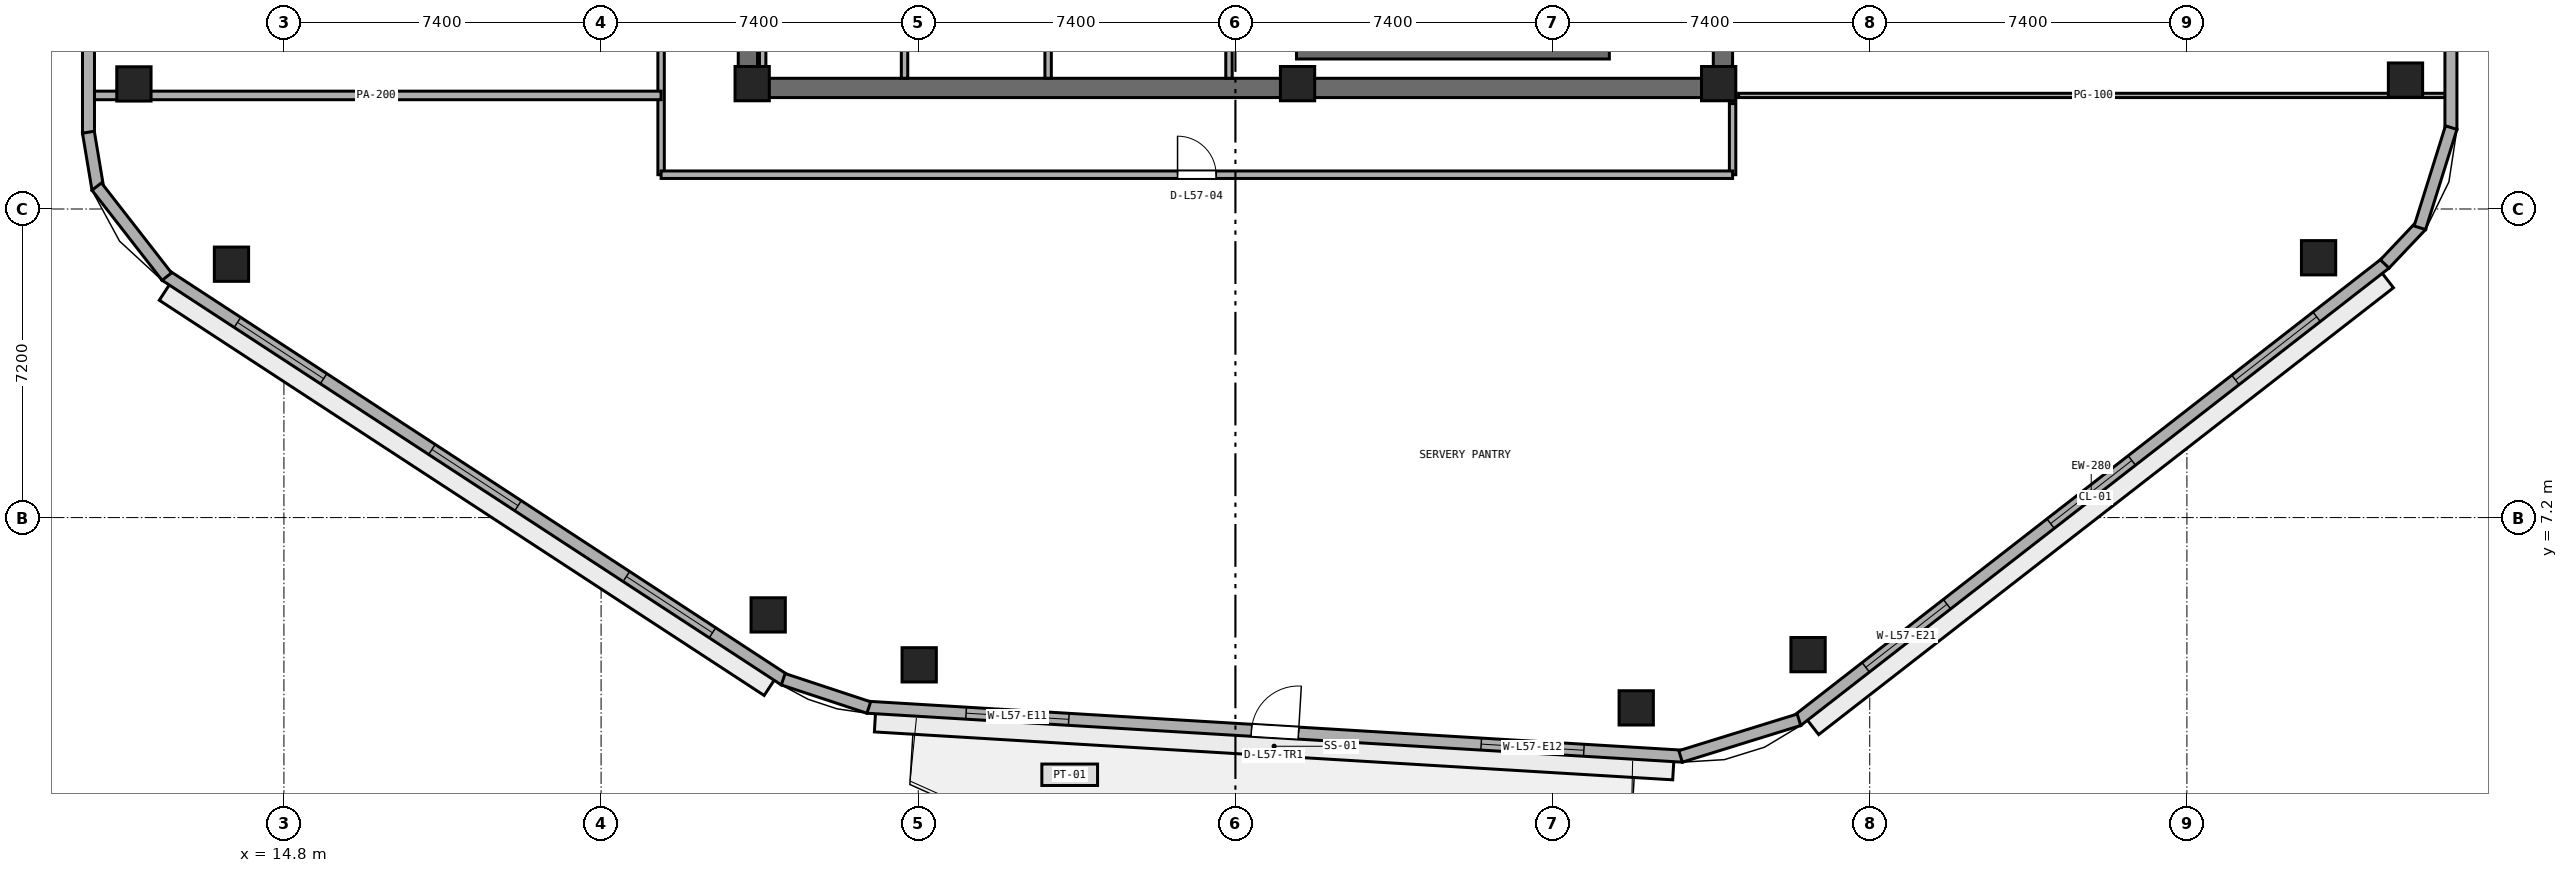
"""IFC4 building model, lengths in metres.
Left out: names, types, materials, properties, quantities, classifications, styles, units other than length and angle.
Written with IfcOpenShell. Run it as: python <this file> out.ifc"""

import sys

from ifc_helpers import new_model, si_unit, direction, frame, frame_2d, origin, origin_2d, place, context, subcontext, project, spatial, rectangle, extrude, element, fill, save


model = new_model("IFC4")
c1 = context("Model", 3, precision=1e-05, world=origin(), true_north=direction((0.0, 1.0)))
c2 = subcontext(c1, "Body", "Model", "MODEL_VIEW")
j1 = project(units=[si_unit("LENGTHUNIT", "METRE"), si_unit("PLANEANGLEUNIT", "RADIAN")], contexts=[c1])
p1 = place(None, origin())
s1 = spatial("IfcSite", under=j1, at=p1, CompositionType="ELEMENT")
p2 = place(p1, origin())
s2 = spatial("IfcBuilding", under=s1, at=p2, CompositionType="ELEMENT")
p3 = place(p2, frame((0.0, 0.0, 225.0)))
s3 = spatial("IfcBuildingStorey", under=s2, at=p3, CompositionType="ELEMENT", Elevation=225.0)
p4 = place(p3, frame((25.4, 17.225, 0.0), z_axis=(0.0, 0.0, 1.0), x_axis=(1.0, 0.0, 0.0)))
e1 = element("IfcWall", 1, at=p4, inside=s3, PredefinedType="SHEAR", context=c2, shape_type="SweptSolid", body=[
    extrude(rectangle(XDim=23.2, YDim=0.45, at=frame_2d((11.6, 0.0))), origin(), (0.0, 0.0, 1.0), 3.51),
])
p5 = place(p3, frame((25.625, 17.45, 0.0), z_axis=(0.0, 0.0, 1.0), x_axis=(0.0, 1.0, 0.0)))
e2 = element("IfcWall", 2, at=p5, inside=s3, PredefinedType="SHEAR", context=c2, shape_type="SweptSolid", body=[
    extrude(rectangle(XDim=15.5, YDim=0.45, at=frame_2d((7.75, 0.0))), origin(), (0.0, 0.0, 1.0), 3.51),
])
p6 = place(p5, frame((7.0, 0.0, 0.0)))
e3 = element("IfcOpeningElement", 3, at=p6, cuts=e2, PredefinedType="OPENING", context=c2, shape_type="SweptSolid", body=[
    extrude(rectangle(XDim=1.5, YDim=2.15, at=frame_2d((0.75, 1.075))), frame((0.0, 0.235, 0.0), z_axis=(0.0, -1.0, 0.0), x_axis=(1.0, 0.0, 0.0)), (0.0, 0.0, 1.0), 0.47),
])
p7 = place(p3, frame((48.375, 17.45, 0.0), z_axis=(0.0, 0.0, 1.0), x_axis=(0.0, 1.0, 0.0)))
e4 = element("IfcWall", 4, at=p7, inside=s3, PredefinedType="SHEAR", context=c2, shape_type="SweptSolid", body=[
    extrude(rectangle(XDim=15.5, YDim=0.45, at=frame_2d((7.75, 0.0))), origin(), (0.0, 0.0, 1.0), 3.51),
])
p8 = place(p7, frame((5.85, 0.0, 0.0)))
e5 = element("IfcOpeningElement", 5, at=p8, cuts=e4, PredefinedType="OPENING", context=c2, shape_type="SweptSolid", body=[
    extrude(rectangle(XDim=1.5, YDim=2.15, at=frame_2d((0.75, 1.075))), frame((0.0, 0.235, 0.0), z_axis=(0.0, -1.0, 0.0), x_axis=(1.0, 0.0, 0.0)), (0.0, 0.0, 1.0), 0.47),
])
for number, where, z_axis, x_axis in (
    (6, (25.725, 17.325, 0.0), (0.0, 0.0, 1.0), (1.0, 0.0, 0.0)),
    (7, (38.45, 17.325, 0.0), (0.0, 0.0, 1.0), (1.0, 0.0, 0.0)),
    (8, (48.275, 17.325, 0.0), (0.0, 0.0, 1.0), (1.0, 0.0, 0.0)),
):
    element("IfcColumn", number, at=place(p3, frame(where, z_axis=z_axis, x_axis=x_axis)), inside=s3, PredefinedType="PILASTER", context=c2, shape_type="SweptSolid", body=[
        extrude(rectangle(XDim=0.8, YDim=0.8, at=origin_2d()), origin(), (0.0, 0.0, 1.0), 3.8),
    ])
for number, where, z_axis, x_axis in (
    (9, (29.622, 3.764, 0.0), (0.0, 0.0, 1.0), (1.0, 0.0, 0.0)),
    (10, (46.352, 2.76, 0.0), (0.0, 0.0, 1.0), (1.0, 0.0, 0.0)),
    (11, (50.361, 4.002, 0.0), (0.0, 0.0, 1.0), (1.0, 0.0, 0.0)),
    (12, (62.272, 13.262, 0.0), (0.0, 0.0, 1.0), (1.0, 0.0, 0.0)),
    (13, (64.3, 17.408, 0.0), (0.0, 0.0, 1.0), (1.0, 0.0, 0.0)),
    (14, (11.3, 17.319, 0.0), (0.0, 0.0, 1.0), (1.0, 0.0, 0.0)),
    (15, (13.576, 13.112, 0.0), (0.0, 0.0, 1.0), (1.0, 0.0, 0.0)),
    (16, (26.099, 4.929, 0.0), (0.0, 0.0, 1.0), (1.0, 0.0, 0.0)),
):
    element("IfcColumn", number, at=place(p3, frame(where, z_axis=z_axis, x_axis=x_axis)), inside=s3, PredefinedType="COLUMN", context=c2, shape_type="SweptSolid", body=[
        extrude(rectangle(XDim=0.8, YDim=0.8, at=origin_2d()), origin(), (0.0, 0.0, 1.0), 3.8),
    ])
p9 = place(p3, frame((38.425, 18.025, 0.0), z_axis=(0.0, 0.0, 1.0), x_axis=(1.0, 0.0, 0.0)))
e17 = element("IfcWall", 17, at=p9, inside=s3, PredefinedType="SHEAR", context=c2, shape_type="SweptSolid", body=[
    extrude(rectangle(XDim=7.3, YDim=0.25, at=frame_2d((3.65, 0.0))), origin(), (0.0, 0.0, 1.0), 3.51),
])
p10 = place(p3, frame((25.97, 17.45, 0.0), z_axis=(0.0, 0.0, 1.0), x_axis=(0.0, 1.0, 0.0)))
e18 = element("IfcWall", 18, at=p10, inside=s3, PredefinedType="PARTITIONING", context=c2, shape_type="SweptSolid", body=[
    extrude(rectangle(XDim=2.3, YDim=0.15, at=frame_2d((1.15, 0.0))), origin(), (0.0, 0.0, 1.0), 2.61),
])
for number, where, z_axis, x_axis in (
    (19, (29.28, 17.45, 0.0), (0.0, 0.0, 1.0), (0.0, 1.0, 0.0)),
    (20, (32.63, 17.45, 0.0), (0.0, 0.0, 1.0), (0.0, 1.0, 0.0)),
    (21, (36.85, 17.45, 0.0), (0.0, 0.0, 1.0), (0.0, 1.0, 0.0)),
):
    element("IfcWall", number, at=place(p3, frame(where, z_axis=z_axis, x_axis=x_axis)), inside=s3, PredefinedType="PARTITIONING", context=c2, shape_type="SweptSolid", body=[
        extrude(rectangle(XDim=2.3, YDim=0.15, at=frame_2d((1.15, 0.0))), origin(), (0.0, 0.0, 1.0), 3.51),
    ])
p11 = place(p3, frame((48.6, 15.2, 0.0), z_axis=(0.0, 0.0, 1.0), x_axis=(0.0, 1.0, 0.0)))
e22 = element("IfcWall", 22, at=p11, inside=s3, PredefinedType="PARTITIONING", context=c2, shape_type="SweptSolid", body=[
    extrude(rectangle(XDim=1.66, YDim=0.15, at=frame_2d((0.83, 0.0))), origin(), (0.0, 0.0, 1.0), 2.893),
])
p12 = place(p3, frame((23.6, 15.2, 0.0), z_axis=(0.0, 0.0, 1.0), x_axis=(0.0, 1.0, 0.0)))
e23 = element("IfcWall", 23, at=p12, inside=s3, PredefinedType="PARTITIONING", context=c2, shape_type="SweptSolid", body=[
    extrude(rectangle(XDim=7.6, YDim=0.15, at=frame_2d((3.8, 0.0))), origin(), (0.0, 0.0, 1.0), 3.51),
])
p13 = place(p3, frame((23.6, 15.2, 0.0), z_axis=(0.0, 0.0, 1.0), x_axis=(1.0, 0.0, 0.0)))
e24 = element("IfcWall", 24, at=p13, inside=s3, PredefinedType="PARTITIONING", context=c2, shape_type="SweptSolid", body=[
    extrude(rectangle(XDim=25.0, YDim=0.175, at=frame_2d((12.5, 0.0))), origin(), (0.0, 0.0, 1.0), 3.51),
])
p14 = place(p13, frame((12.05, 0.0, 0.0)))
e25 = element("IfcOpeningElement", 25, at=p14, cuts=e24, PredefinedType="OPENING", context=c2, shape_type="SweptSolid", body=[
    extrude(rectangle(XDim=0.9, YDim=2.1, at=frame_2d((0.45, 1.05))), frame((0.0, 0.097, 0.0), z_axis=(0.0, -1.0, 0.0), x_axis=(1.0, 0.0, 0.0)), (0.0, 0.0, 1.0), 0.195),
])
p15 = place(p3, frame((10.305, 17.05, 0.0), z_axis=(0.0, 0.0, 1.0), x_axis=(1.0, 0.0, 0.0)))
e26 = element("IfcWall", 26, at=p15, inside=s3, PredefinedType="PARTITIONING", context=c2, shape_type="SweptSolid", body=[
    extrude(rectangle(XDim=13.295, YDim=0.2, at=frame_2d((6.647, 0.0))), origin(), (0.0, 0.0, 1.0), 3.51),
])
p16 = place(p3, frame((48.74, 17.05, 0.0), z_axis=(0.0, 0.0, 1.0), x_axis=(1.0, 0.0, 0.0)))
e27 = element("IfcWall", 27, at=p16, inside=s3, PredefinedType="PARTITIONING", context=c2, shape_type="SweptSolid", body=[
    extrude(rectangle(XDim=16.555, YDim=0.1, at=frame_2d((8.277, 0.0))), origin(), (0.0, 0.0, 1.0), 2.893),
])
p17 = place(p3, frame((28.411, 2.774, 0.0), z_axis=(0.0, 0.0, 1.0), x_axis=(0.998203068368, -0.059921901676, 0.0)))
e28 = element("IfcWall", 28, at=p17, inside=s3, PredefinedType="STANDARD", context=c2, shape_type="SweptSolid", body=[
    extrude(rectangle(XDim=19.06, YDim=0.28, at=frame_2d((9.53, 0.0))), origin(), (0.0, 0.0, 1.0), 3.51),
])
p18 = place(p17, frame((8.98, 0.0, 0.0)))
e29 = element("IfcOpeningElement", 29, at=p18, cuts=e28, PredefinedType="OPENING", context=c2, shape_type="SweptSolid", body=[
    extrude(rectangle(XDim=1.1, YDim=2.2, at=frame_2d((0.55, 1.1))), frame((0.0, 0.15, 0.0), z_axis=(0.0, -1.0, 0.0), x_axis=(1.0, 0.0, 0.0)), (0.0, 0.0, 1.0), 0.3),
])
p19 = place(p17, frame((2.31, 0.0, 0.9)))
e30 = element("IfcOpeningElement", 30, at=p19, cuts=e28, PredefinedType="OPENING", context=c2, shape_type="SweptSolid", body=[
    extrude(rectangle(XDim=2.4, YDim=1.75, at=frame_2d((1.2, 0.875))), frame((0.0, 0.15, 0.0), z_axis=(0.0, -1.0, 0.0), x_axis=(1.0, 0.0, 0.0)), (0.0, 0.0, 1.0), 0.3),
])
p20 = place(p17, frame((14.35, 0.0, 0.9)))
e31 = element("IfcOpeningElement", 31, at=p20, cuts=e28, PredefinedType="OPENING", context=c2, shape_type="SweptSolid", body=[
    extrude(rectangle(XDim=2.4, YDim=1.75, at=frame_2d((1.2, 0.875))), frame((0.0, 0.15, 0.0), z_axis=(0.0, -1.0, 0.0), x_axis=(1.0, 0.0, 0.0)), (0.0, 0.0, 1.0), 0.3),
])
p21 = place(p3, frame((50.104, 2.459, 0.0), z_axis=(0.0, 0.0, 1.0), x_axis=(0.789464857485, 0.613795763097, 0.0)))
e32 = element("IfcWall", 32, at=p21, inside=s3, PredefinedType="STANDARD", context=c2, shape_type="SweptSolid", body=[
    extrude(rectangle(XDim=17.387, YDim=0.28, at=frame_2d((8.694, 0.0))), origin(), (0.0, 0.0, 1.0), 3.51),
])
p22 = place(p21, frame((2.031, 0.0, 0.9)))
e33 = element("IfcOpeningElement", 33, at=p22, cuts=e32, PredefinedType="OPENING", context=c2, shape_type="SweptSolid", body=[
    extrude(rectangle(XDim=2.4, YDim=1.75, at=frame_2d((1.2, 0.875))), frame((0.0, 0.15, 0.0), z_axis=(0.0, -1.0, 0.0), x_axis=(1.0, 0.0, 0.0)), (0.0, 0.0, 1.0), 0.3),
])
p23 = place(p21, frame((7.494, 0.0, 0.9)))
e34 = element("IfcOpeningElement", 34, at=p23, cuts=e32, PredefinedType="OPENING", context=c2, shape_type="SweptSolid", body=[
    extrude(rectangle(XDim=2.4, YDim=1.75, at=frame_2d((1.2, 0.875))), frame((0.0, 0.15, 0.0), z_axis=(0.0, -1.0, 0.0), x_axis=(1.0, 0.0, 0.0)), (0.0, 0.0, 1.0), 0.3),
])
p24 = place(p21, frame((12.956, 0.0, 0.9)))
e35 = element("IfcOpeningElement", 35, at=p24, cuts=e32, PredefinedType="OPENING", context=c2, shape_type="SweptSolid", body=[
    extrude(rectangle(XDim=2.4, YDim=1.75, at=frame_2d((1.2, 0.875))), frame((0.0, 0.15, 0.0), z_axis=(0.0, -1.0, 0.0), x_axis=(1.0, 0.0, 0.0)), (0.0, 0.0, 1.0), 0.3),
])
p25 = place(p3, frame((65.36, 16.258, 0.0), z_axis=(0.0, 0.0, 1.0), x_axis=(0.0, 1.0, 0.0)))
e36 = element("IfcWall", 36, at=p25, inside=s3, PredefinedType="STANDARD", context=c2, shape_type="SweptSolid", body=[
    extrude(rectangle(XDim=5.872, YDim=0.28, at=frame_2d((2.936, 0.0))), origin(), (0.0, 0.0, 1.0), 3.51),
])
p26 = place(p3, frame((10.24, 19.75, 0.0), z_axis=(0.0, 0.0, 1.0), x_axis=(0.0, -1.0, 0.0)))
e37 = element("IfcWall", 37, at=p26, inside=s3, PredefinedType="STANDARD", context=c2, shape_type="SweptSolid", body=[
    extrude(rectangle(XDim=3.581, YDim=0.28, at=frame_2d((1.791, 0.0))), origin(), (0.0, 0.0, 1.0), 3.51),
])
p27 = place(p3, frame((12.034, 12.854, 0.0), z_axis=(0.0, 0.0, 1.0), x_axis=(0.837118352984, -0.547021812269, 0.0)))
e38 = element("IfcWall", 38, at=p27, inside=s3, PredefinedType="STANDARD", context=c2, shape_type="SweptSolid", body=[
    extrude(rectangle(XDim=17.259, YDim=0.28, at=frame_2d((8.63, 0.0))), origin(), (0.0, 0.0, 1.0), 3.51),
])
p28 = place(p27, frame((2.01, 0.0, 0.9)))
e39 = element("IfcOpeningElement", 39, at=p28, cuts=e38, PredefinedType="OPENING", context=c2, shape_type="SweptSolid", body=[
    extrude(rectangle(XDim=2.4, YDim=1.75, at=frame_2d((1.2, 0.875))), frame((0.0, 0.15, 0.0), z_axis=(0.0, -1.0, 0.0), x_axis=(1.0, 0.0, 0.0)), (0.0, 0.0, 1.0), 0.3),
])
p29 = place(p27, frame((7.43, 0.0, 0.9)))
e40 = element("IfcOpeningElement", 40, at=p29, cuts=e38, PredefinedType="OPENING", context=c2, shape_type="SweptSolid", body=[
    extrude(rectangle(XDim=2.4, YDim=1.75, at=frame_2d((1.2, 0.875))), frame((0.0, 0.15, 0.0), z_axis=(0.0, -1.0, 0.0), x_axis=(1.0, 0.0, 0.0)), (0.0, 0.0, 1.0), 0.3),
])
p30 = place(p27, frame((12.849, 0.0, 0.9)))
e41 = element("IfcOpeningElement", 41, at=p30, cuts=e38, PredefinedType="OPENING", context=c2, shape_type="SweptSolid", body=[
    extrude(rectangle(XDim=2.4, YDim=1.75, at=frame_2d((1.2, 0.875))), frame((0.0, 0.15, 0.0), z_axis=(0.0, -1.0, 0.0), x_axis=(1.0, 0.0, 0.0)), (0.0, 0.0, 1.0), 0.3),
])
p31 = place(p3, frame((47.386, 1.626, 0.0), z_axis=(0.0, 0.0, 1.0), x_axis=(0.955189316149, 0.29599555793, 0.0)))
e42 = element("IfcWall", 42, at=p31, inside=s3, PredefinedType="STANDARD", context=c2, shape_type="SweptSolid", body=[
    extrude(rectangle(XDim=2.892, YDim=0.28, at=frame_2d((1.446, 0.0))), origin(), (0.0, 0.0, 1.0), 3.51),
])
p32 = place(p3, frame((63.815, 13.117, 0.0), z_axis=(0.0, 0.0, 1.0), x_axis=(0.687733716128, 0.725963040176, 0.0)))
e43 = element("IfcWall", 43, at=p32, inside=s3, PredefinedType="STANDARD", context=c2, shape_type="SweptSolid", body=[
    extrude(rectangle(XDim=1.239, YDim=0.28, at=frame_2d((0.62, 0.0))), origin(), (0.0, 0.0, 1.0), 3.51),
])
p33 = place(p3, frame((64.635, 13.962, 0.0), z_axis=(0.0, 0.0, 1.0), x_axis=(0.298649578722, 0.954362839348, 0.0)))
e44 = element("IfcWall", 44, at=p33, inside=s3, PredefinedType="STANDARD", context=c2, shape_type="SweptSolid", body=[
    extrude(rectangle(XDim=2.449, YDim=0.28, at=frame_2d((1.225, 0.0))), origin(), (0.0, 0.0, 1.0), 3.51),
])
p34 = place(p3, frame((10.238, 16.192, 0.0), z_axis=(0.0, 0.0, 1.0), x_axis=(0.164604311367, -0.986359681191, 0.0)))
e45 = element("IfcWall", 45, at=p34, inside=s3, PredefinedType="STANDARD", context=c2, shape_type="SweptSolid", body=[
    extrude(rectangle(XDim=1.35, YDim=0.28, at=frame_2d((0.675, 0.0))), origin(), (0.0, 0.0, 1.0), 3.51),
])
p35 = place(p3, frame((10.433, 14.923, 0.0), z_axis=(0.0, 0.0, 1.0), x_axis=(0.614181852676, -0.78916452774, 0.0)))
e46 = element("IfcWall", 46, at=p35, inside=s3, PredefinedType="STANDARD", context=c2, shape_type="SweptSolid", body=[
    extrude(rectangle(XDim=2.662, YDim=0.28, at=frame_2d((1.331, 0.0))), origin(), (0.0, 0.0, 1.0), 3.51),
])
p36 = place(p3, frame((26.449, 3.428, 0.0), z_axis=(0.0, 0.0, 1.0), x_axis=(0.949435039229, -0.313963542923, 0.0)))
e47 = element("IfcWall", 47, at=p36, inside=s3, PredefinedType="STANDARD", context=c2, shape_type="SweptSolid", body=[
    extrude(rectangle(XDim=2.104, YDim=0.28, at=frame_2d((1.052, 0.0))), origin(), (0.0, 0.0, 1.0), 3.51),
])
p37 = place(p14, origin())
e48 = element("IfcDoor", 48, at=p37, inside=s3, OperationType="SINGLE_SWING_LEFT", PredefinedType="DOOR", context=c2, shape_type="SweptSolid", body=[
    extrude(rectangle(XDim=0.9, YDim=2.1, at=frame_2d((0.45, 1.05))), frame((0.0, 0.025, 0.0), z_axis=(0.0, -1.0, 0.0), x_axis=(1.0, 0.0, 0.0)), (0.0, 0.0, 1.0), 0.05),
])
fill(e25, e48)
p38 = place(p18, origin())
e49 = element("IfcDoor", 49, at=p38, inside=s3, OperationType="SINGLE_SWING_RIGHT", PredefinedType="DOOR", context=c2, shape_type="SweptSolid", body=[
    extrude(rectangle(XDim=1.1, YDim=2.2, at=frame_2d((0.55, 1.1))), frame((0.0, 0.025, 0.0), z_axis=(0.0, -1.0, 0.0), x_axis=(1.0, 0.0, 0.0)), (0.0, 0.0, 1.0), 0.05),
])
fill(e29, e49)
p39 = place(p19, origin())
e50 = element("IfcWindow", 50, at=p39, inside=s3, PartitioningType="SINGLE_PANEL", PredefinedType="WINDOW", context=c2, shape_type="SweptSolid", body=[
    extrude(rectangle(XDim=2.4, YDim=1.75, at=frame_2d((1.2, 0.875))), frame((0.0, 0.03, 0.0), z_axis=(0.0, -1.0, 0.0), x_axis=(1.0, 0.0, 0.0)), (0.0, 0.0, 1.0), 0.06),
])
fill(e30, e50)
p40 = place(p20, origin())
e51 = element("IfcWindow", 51, at=p40, inside=s3, PartitioningType="SINGLE_PANEL", PredefinedType="WINDOW", context=c2, shape_type="SweptSolid", body=[
    extrude(rectangle(XDim=2.4, YDim=1.75, at=frame_2d((1.2, 0.875))), frame((0.0, 0.03, 0.0), z_axis=(0.0, -1.0, 0.0), x_axis=(1.0, 0.0, 0.0)), (0.0, 0.0, 1.0), 0.06),
])
fill(e31, e51)
p41 = place(p22, origin())
e52 = element("IfcWindow", 52, at=p41, inside=s3, PartitioningType="SINGLE_PANEL", PredefinedType="WINDOW", context=c2, shape_type="SweptSolid", body=[
    extrude(rectangle(XDim=2.4, YDim=1.75, at=frame_2d((1.2, 0.875))), frame((0.0, 0.03, 0.0), z_axis=(0.0, -1.0, 0.0), x_axis=(1.0, 0.0, 0.0)), (0.0, 0.0, 1.0), 0.06),
])
fill(e33, e52)
p42 = place(p23, origin())
e53 = element("IfcWindow", 53, at=p42, inside=s3, PartitioningType="SINGLE_PANEL", PredefinedType="WINDOW", context=c2, shape_type="SweptSolid", body=[
    extrude(rectangle(XDim=2.4, YDim=1.75, at=frame_2d((1.2, 0.875))), frame((0.0, 0.03, 0.0), z_axis=(0.0, -1.0, 0.0), x_axis=(1.0, 0.0, 0.0)), (0.0, 0.0, 1.0), 0.06),
])
fill(e34, e53)
p43 = place(p24, origin())
e54 = element("IfcWindow", 54, at=p43, inside=s3, PartitioningType="SINGLE_PANEL", PredefinedType="WINDOW", context=c2, shape_type="SweptSolid", body=[
    extrude(rectangle(XDim=2.4, YDim=1.75, at=frame_2d((1.2, 0.875))), frame((0.0, 0.03, 0.0), z_axis=(0.0, -1.0, 0.0), x_axis=(1.0, 0.0, 0.0)), (0.0, 0.0, 1.0), 0.06),
])
fill(e35, e54)
p44 = place(p28, origin())
e55 = element("IfcWindow", 55, at=p44, inside=s3, PartitioningType="SINGLE_PANEL", PredefinedType="WINDOW", context=c2, shape_type="SweptSolid", body=[
    extrude(rectangle(XDim=2.4, YDim=1.75, at=frame_2d((1.2, 0.875))), frame((0.0, 0.03, 0.0), z_axis=(0.0, -1.0, 0.0), x_axis=(1.0, 0.0, 0.0)), (0.0, 0.0, 1.0), 0.06),
])
fill(e39, e55)
p45 = place(p29, origin())
e56 = element("IfcWindow", 56, at=p45, inside=s3, PartitioningType="SINGLE_PANEL", PredefinedType="WINDOW", context=c2, shape_type="SweptSolid", body=[
    extrude(rectangle(XDim=2.4, YDim=1.75, at=frame_2d((1.2, 0.875))), frame((0.0, 0.03, 0.0), z_axis=(0.0, -1.0, 0.0), x_axis=(1.0, 0.0, 0.0)), (0.0, 0.0, 1.0), 0.06),
])
fill(e40, e56)
p46 = place(p30, origin())
e57 = element("IfcWindow", 57, at=p46, inside=s3, PartitioningType="SINGLE_PANEL", PredefinedType="WINDOW", context=c2, shape_type="SweptSolid", body=[
    extrude(rectangle(XDim=2.4, YDim=1.75, at=frame_2d((1.2, 0.875))), frame((0.0, 0.03, 0.0), z_axis=(0.0, -1.0, 0.0), x_axis=(1.0, 0.0, 0.0)), (0.0, 0.0, 1.0), 0.06),
])
fill(e41, e57)
save(model, sys.argv[1])
